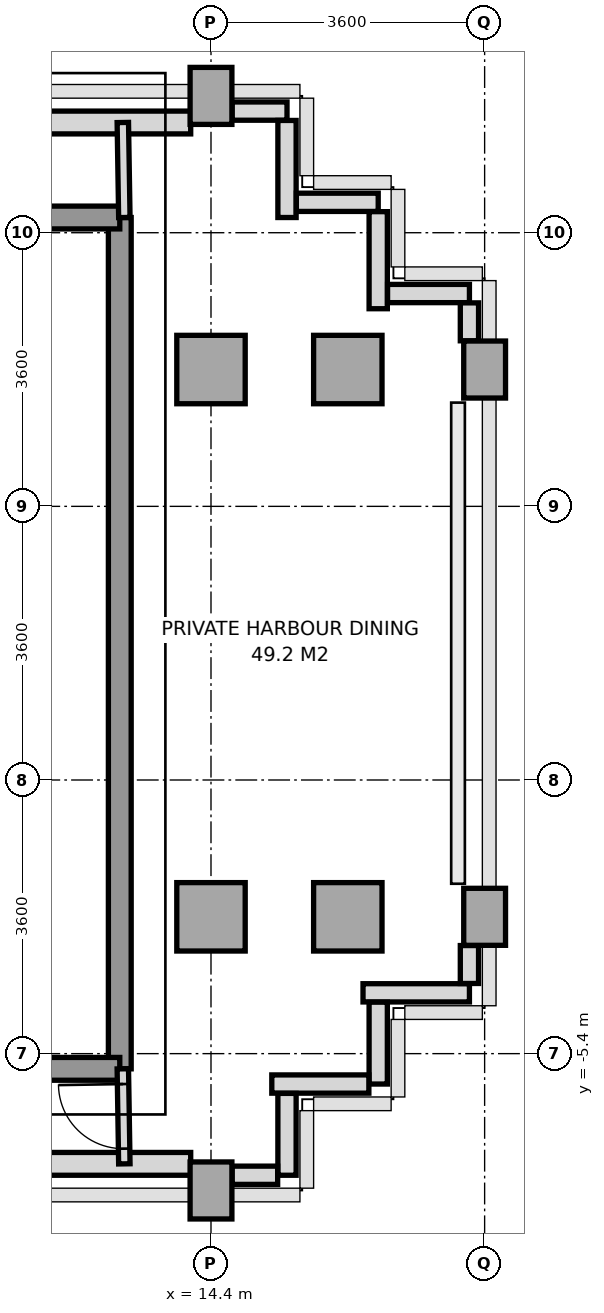
"""IFC4 building model, lengths in metres.
Left out: names, types, materials, properties, quantities, classifications, styles, units other than length and angle.
Written with IfcOpenShell. Run it as: python <this file> out.ifc"""

import sys

from ifc_helpers import new_model, si_unit, direction, frame, frame_2d, origin, origin_2d, place, context, subcontext, project, spatial, rectangle, extrude, source, transform, mapped, element, fill, save


model = new_model("IFC4")
c1 = context("Model", 3, precision=1e-05, world=origin(), true_north=direction((0.0, 1.0)))
c2 = subcontext(c1, "Body", "Model", "MODEL_VIEW")
j1 = project(units=[si_unit("LENGTHUNIT", "METRE"), si_unit("PLANEANGLEUNIT", "RADIAN")], contexts=[c1])
p1 = place(None, origin())
s1 = spatial("IfcSite", under=j1, at=p1, CompositionType="ELEMENT")
p2 = place(p1, origin())
s2 = spatial("IfcBuilding", under=s1, at=p2, CompositionType="ELEMENT")
p3 = place(p2, frame((0.0, 0.0, 242.8)))
s3 = spatial("IfcBuildingStorey", under=s2, at=p3, CompositionType="ELEMENT", Elevation=242.8)
m1 = source(origin(), c2, "Body", "SweptSolid", [
    extrude(rectangle(XDim=0.55, YDim=0.75, at=origin_2d()), origin(), (0.0, 0.0, 1.0), 3.01),
])
p4 = place(p3, frame((14.4, -7.2, 0.0), z_axis=(0.0, 0.0, 1.0), x_axis=(1.0, 0.0, 0.0)))
e1 = element("IfcColumn", 1, at=p4, inside=s3, PredefinedType="COLUMN", context=c2, shape_type="MappedRepresentation", body=[
    mapped(m1, transform((0.0, 0.0, 0.0), x_axis=(1.0, 0.0, 0.0), y_axis=(0.0, 1.0, 0.0), z_axis=(0.0, 0.0, 1.0), scale=1.0)),
])
m2 = source(origin(), c2, "Body", "SweptSolid", [
    extrude(rectangle(XDim=0.9, YDim=0.9, at=origin_2d()), origin(), (0.0, 0.0, 1.0), 3.01),
])
for number, where, z_axis, x_axis in (
    (2, (14.4, -3.6, 0.0), (0.0, 0.0, 1.0), (1.0, 0.0, 0.0)),
    (3, (14.4, 3.6, 0.0), (0.0, 0.0, 1.0), (1.0, 0.0, 0.0)),
):
    element("IfcColumn", number, at=place(p3, frame(where, z_axis=z_axis, x_axis=x_axis)), inside=s3, PredefinedType="COLUMN", context=c2, shape_type="MappedRepresentation", body=[
        mapped(m2, transform((0.0, 0.0, 0.0), x_axis=(1.0, 0.0, 0.0), y_axis=(0.0, 1.0, 0.0), z_axis=(0.0, 0.0, 1.0), scale=1.0)),
    ])
p5 = place(p3, frame((14.4, 7.2, 0.0), z_axis=(0.0, 0.0, 1.0), x_axis=(1.0, 0.0, 0.0)))
e4 = element("IfcColumn", 4, at=p5, inside=s3, PredefinedType="COLUMN", context=c2, shape_type="MappedRepresentation", body=[
    mapped(m1, transform((0.0, 0.0, 0.0), x_axis=(1.0, 0.0, 0.0), y_axis=(0.0, 1.0, 0.0), z_axis=(0.0, 0.0, 1.0), scale=1.0)),
])
for number, where, z_axis, x_axis in (
    (5, (16.2, -3.6, 0.0), (0.0, 0.0, 1.0), (1.0, 0.0, 0.0)),
    (6, (16.2, 3.6, 0.0), (0.0, 0.0, 1.0), (1.0, 0.0, 0.0)),
):
    element("IfcColumn", number, at=place(p3, frame(where, z_axis=z_axis, x_axis=x_axis)), inside=s3, PredefinedType="COLUMN", context=c2, shape_type="MappedRepresentation", body=[
        mapped(m2, transform((0.0, 0.0, 0.0), x_axis=(1.0, 0.0, 0.0), y_axis=(0.0, 1.0, 0.0), z_axis=(0.0, 0.0, 1.0), scale=1.0)),
    ])
for number, where, z_axis, x_axis in (
    (7, (18.0, -3.6, 0.0), (0.0, 0.0, 1.0), (1.0, 0.0, 0.0)),
    (8, (18.0, 3.6, 0.0), (0.0, 0.0, 1.0), (1.0, 0.0, 0.0)),
):
    element("IfcColumn", number, at=place(p3, frame(where, z_axis=z_axis, x_axis=x_axis)), inside=s3, PredefinedType="COLUMN", context=c2, shape_type="MappedRepresentation", body=[
        mapped(m1, transform((0.0, 0.0, 0.0), x_axis=(1.0, 0.0, 0.0), y_axis=(0.0, 1.0, 0.0), z_axis=(0.0, 0.0, 1.0), scale=1.0)),
    ])
p6 = place(p3, frame((11.448, 6.85, 0.0), z_axis=(0.0, 0.0, 1.0), x_axis=(1.0, 0.0, 0.0)))
e9 = element("IfcWall", 9, at=p6, inside=s3, PredefinedType="SOLIDWALL", context=c2, shape_type="SweptSolid", body=[
    extrude(rectangle(XDim=2.685, YDim=0.3, at=frame_2d((1.343, 0.0))), origin(), (0.0, 0.0, 1.0), 2.57),
])
p7 = place(p3, frame((11.75, -6.85, 0.0), z_axis=(0.0, 0.0, 1.0), x_axis=(1.0, 0.0, 0.0)))
e10 = element("IfcWall", 10, at=p7, inside=s3, PredefinedType="SOLIDWALL", context=c2, shape_type="SweptSolid", body=[
    extrude(rectangle(XDim=2.383, YDim=0.3, at=frame_2d((1.191, 0.0))), origin(), (0.0, 0.0, 1.0), 2.57),
])
p8 = place(p3, frame((17.8, -4.6, 0.0), z_axis=(0.0, 0.0, 1.0), x_axis=(-1.0, 0.0, 0.0)))
e11 = element("IfcWall", 11, at=p8, inside=s3, PredefinedType="PARAPET", context=c2, shape_type="SweptSolid", body=[
    extrude(rectangle(XDim=1.4, YDim=0.24, at=frame_2d((0.7, 0.0))), origin(), (0.0, 0.0, 1.0), 1.15),
])
p9 = place(p3, frame((16.6, -4.723, 0.0), z_axis=(0.0, 0.0, 1.0), x_axis=(0.0, -1.0, 0.0)))
e12 = element("IfcWall", 12, at=p9, inside=s3, PredefinedType="PARAPET", context=c2, shape_type="SweptSolid", body=[
    extrude(rectangle(XDim=1.077, YDim=0.24, at=frame_2d((0.539, 0.0))), origin(), (0.0, 0.0, 1.0), 1.15),
])
p10 = place(p3, frame((16.477, -5.8, 0.0), z_axis=(0.0, 0.0, 1.0), x_axis=(-1.0, 0.0, 0.0)))
e13 = element("IfcWall", 13, at=p10, inside=s3, PredefinedType="PARAPET", context=c2, shape_type="SweptSolid", body=[
    extrude(rectangle(XDim=1.277, YDim=0.24, at=frame_2d((0.639, 0.0))), origin(), (0.0, 0.0, 1.0), 1.15),
])
p11 = place(p3, frame((15.4, -5.923, 0.0), z_axis=(0.0, 0.0, 1.0), x_axis=(0.0, -1.0, 0.0)))
e14 = element("IfcWall", 14, at=p11, inside=s3, PredefinedType="PARAPET", context=c2, shape_type="SweptSolid", body=[
    extrude(rectangle(XDim=1.077, YDim=0.24, at=frame_2d((0.539, 0.0))), origin(), (0.0, 0.0, 1.0), 1.15),
])
p12 = place(p3, frame((15.277, -7.0, 0.0), z_axis=(0.0, 0.0, 1.0), x_axis=(-1.0, 0.0, 0.0)))
e15 = element("IfcWall", 15, at=p12, inside=s3, PredefinedType="PARAPET", context=c2, shape_type="SweptSolid", body=[
    extrude(rectangle(XDim=0.599, YDim=0.24, at=frame_2d((0.3, 0.0))), origin(), (0.0, 0.0, 1.0), 1.15),
])
p13 = place(p3, frame((14.678, 7.0, 0.0), z_axis=(0.0, 0.0, 1.0), x_axis=(1.0, 0.0, 0.0)))
e16 = element("IfcWall", 16, at=p13, inside=s3, PredefinedType="PARAPET", context=c2, shape_type="SweptSolid", body=[
    extrude(rectangle(XDim=0.722, YDim=0.24, at=frame_2d((0.361, 0.0))), origin(), (0.0, 0.0, 1.0), 1.15),
])
p14 = place(p3, frame((15.4, 6.877, 0.0), z_axis=(0.0, 0.0, 1.0), x_axis=(0.0, -1.0, 0.0)))
e17 = element("IfcWall", 17, at=p14, inside=s3, PredefinedType="PARAPET", context=c2, shape_type="SweptSolid", body=[
    extrude(rectangle(XDim=1.277, YDim=0.24, at=frame_2d((0.638, 0.0))), origin(), (0.0, 0.0, 1.0), 1.15),
])
p15 = place(p3, frame((15.523, 5.8, 0.0), z_axis=(0.0, 0.0, 1.0), x_axis=(1.0, 0.0, 0.0)))
e18 = element("IfcWall", 18, at=p15, inside=s3, PredefinedType="PARAPET", context=c2, shape_type="SweptSolid", body=[
    extrude(rectangle(XDim=1.077, YDim=0.24, at=frame_2d((0.539, 0.0))), origin(), (0.0, 0.0, 1.0), 1.15),
])
p16 = place(p3, frame((16.6, 5.677, 0.0), z_axis=(0.0, 0.0, 1.0), x_axis=(0.0, -1.0, 0.0)))
e19 = element("IfcWall", 19, at=p16, inside=s3, PredefinedType="PARAPET", context=c2, shape_type="SweptSolid", body=[
    extrude(rectangle(XDim=1.277, YDim=0.24, at=frame_2d((0.639, 0.0))), origin(), (0.0, 0.0, 1.0), 1.15),
])
p17 = place(p3, frame((16.723, 4.6, 0.0), z_axis=(0.0, 0.0, 1.0), x_axis=(1.0, 0.0, 0.0)))
e20 = element("IfcWall", 20, at=p17, inside=s3, PredefinedType="PARAPET", context=c2, shape_type="SweptSolid", body=[
    extrude(rectangle(XDim=1.077, YDim=0.24, at=frame_2d((0.539, 0.0))), origin(), (0.0, 0.0, 1.0), 1.15),
])
for number, where, z_axis, x_axis in (
    (21, (17.8, 4.477, 0.0), (0.0, 0.0, 1.0), (0.0, -1.0, 0.0)),
    (22, (17.8, -3.978, 0.0), (0.0, 0.0, 1.0), (0.0, -1.0, 0.0)),
):
    element("IfcWall", number, at=place(p3, frame(where, z_axis=z_axis, x_axis=x_axis)), inside=s3, PredefinedType="PARAPET", context=c2, shape_type="SweptSolid", body=[
        extrude(rectangle(XDim=0.499, YDim=0.24, at=frame_2d((0.25, 0.0))), origin(), (0.0, 0.0, 1.0), 1.15),
    ])
p18 = place(p3, frame((13.2, -5.6, 0.0), z_axis=(0.0, 0.0, 1.0), x_axis=(0.0, 1.0, 0.0)))
e23 = element("IfcWall", 23, at=p18, inside=s3, PredefinedType="SHEAR", context=c2, shape_type="SweptSolid", body=[
    extrude(rectangle(XDim=11.2, YDim=0.3, at=frame_2d((5.6, 0.0))), origin(), (0.0, 0.0, 1.0), 3.01),
])
p19 = place(p3, frame((11.356, 5.6, 0.0), z_axis=(0.0, 0.0, 1.0), x_axis=(1.0, 0.0, 0.0)))
e24 = element("IfcWall", 24, at=p19, inside=s3, PredefinedType="SHEAR", context=c2, shape_type="SweptSolid", body=[
    extrude(rectangle(XDim=1.844, YDim=0.3, at=frame_2d((0.922, 0.0))), origin(), (0.0, 0.0, 1.0), 3.01),
])
p20 = place(p3, frame((5.4, -5.6, 0.0), z_axis=(0.0, 0.0, 1.0), x_axis=(1.0, 0.0, 0.0)))
e25 = element("IfcWall", 25, at=p20, inside=s3, PredefinedType="SHEAR", context=c2, shape_type="SweptSolid", body=[
    extrude(rectangle(XDim=7.8, YDim=0.3, at=frame_2d((3.9, 0.0))), origin(), (0.0, 0.0, 1.0), 3.01),
])
p21 = place(p3, frame((13.26, 5.6, 0.0), z_axis=(0.0, 0.0, 1.0), x_axis=(-0.016013571389, 0.999871774545, 0.0)))
e26 = element("IfcWall", 26, at=p21, inside=s3, PredefinedType="PARTITIONING", context=c2, shape_type="SweptSolid", body=[
    extrude(rectangle(XDim=1.25, YDim=0.15, at=frame_2d((0.625, 0.0))), origin(), (0.0, 0.0, 1.0), 3.01),
])
p22 = place(p3, frame((13.26, -6.85, 0.0), z_axis=(0.0, 0.0, 1.0), x_axis=(-0.016013571389, 0.999871774545, 0.0)))
e27 = element("IfcWall", 27, at=p22, inside=s3, PredefinedType="PARTITIONING", context=c2, shape_type="SweptSolid", body=[
    extrude(rectangle(XDim=1.25, YDim=0.15, at=frame_2d((0.625, 0.0))), origin(), (0.0, 0.0, 1.0), 3.01),
])
p23 = place(p22, frame((0.2, 0.0, 0.0)))
e28 = element("IfcOpeningElement", 28, at=p23, cuts=e27, PredefinedType="OPENING", context=c2, shape_type="SweptSolid", body=[
    extrude(rectangle(XDim=0.85, YDim=2.1, at=frame_2d((0.425, 1.05))), frame((0.0, 0.085, 0.0), z_axis=(0.0, -1.0, 0.0), x_axis=(1.0, 0.0, 0.0)), (0.0, 0.0, 1.0), 0.17),
])
m3 = source(origin(), c2, "Body", "SweptSolid", [
    extrude(rectangle(XDim=0.85, YDim=2.1, at=frame_2d((0.425, 1.05))), frame((0.0, 0.025, 0.0), z_axis=(0.0, -1.0, 0.0), x_axis=(1.0, 0.0, 0.0)), (0.0, 0.0, 1.0), 0.05),
])
p24 = place(p23, origin())
e29 = element("IfcDoor", 29, at=p24, inside=s3, OperationType="SINGLE_SWING_RIGHT", PredefinedType="DOOR", context=c2, shape_type="MappedRepresentation", body=[
    mapped(m3, transform((0.0, 0.0, 0.0), x_axis=(1.0, 0.0, 0.0), y_axis=(0.0, 1.0, 0.0), z_axis=(0.0, 0.0, 1.0), scale=1.0)),
])
fill(e28, e29)
save(model, sys.argv[1])
